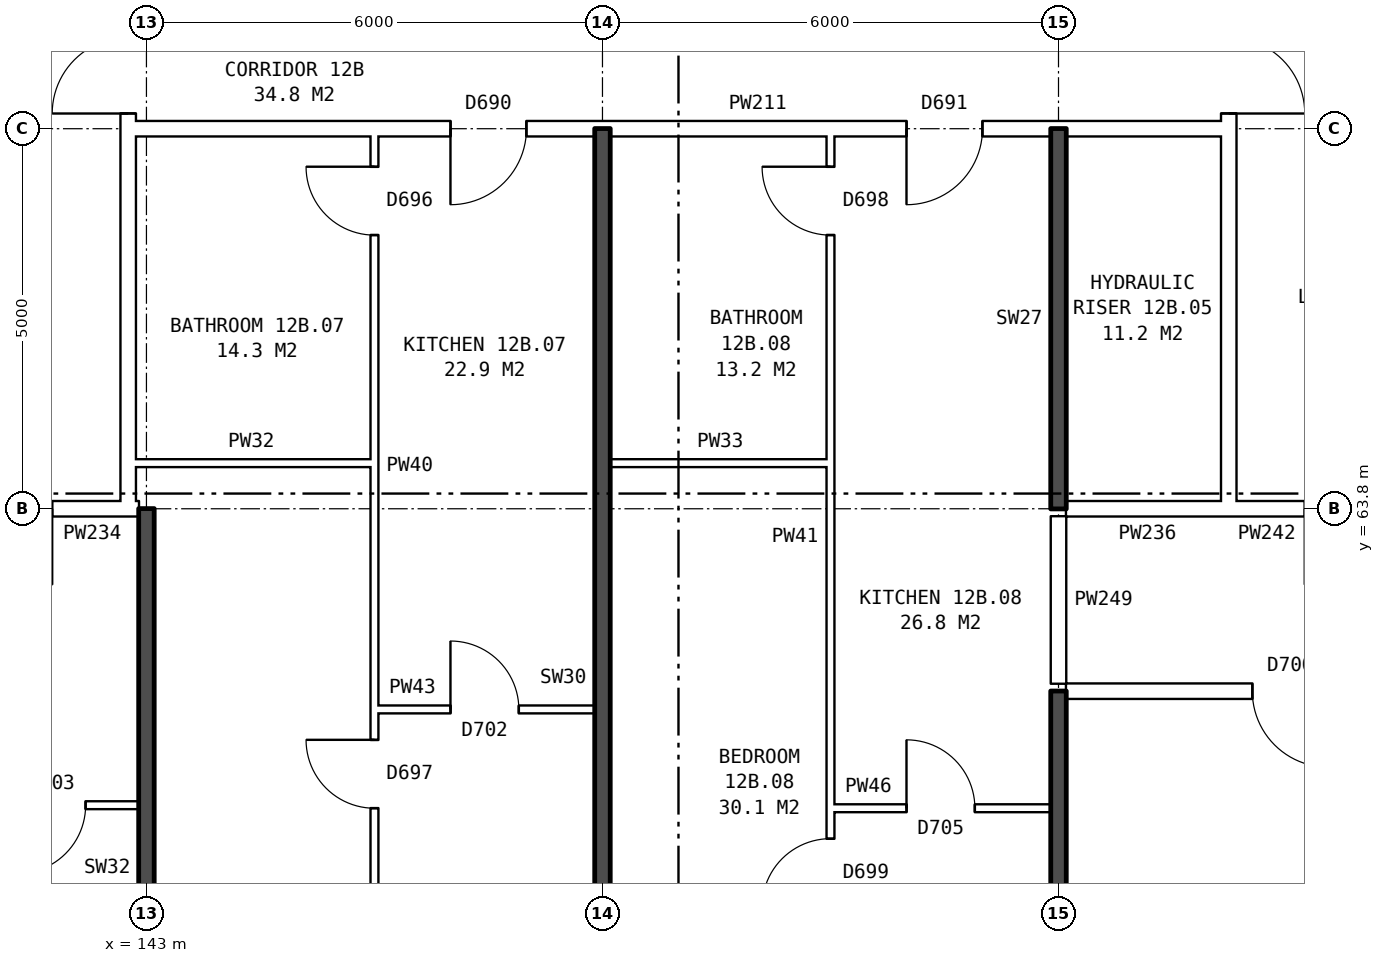
"""IFC4 building model, lengths in metres.
Left out: names, types, materials, properties, quantities, classifications, styles, units other than length and angle.
Written with IfcOpenShell. Run it as: python <this file> out.ifc"""

import sys

from ifc_helpers import new_model, si_unit, direction, frame, frame_2d, origin, place, context, subcontext, project, spatial, rectangle, extrude, element, fill, save


model = new_model("IFC4")
c1 = context("Model", 3, precision=1e-05, world=origin(), true_north=direction((0.0, 1.0)))
c2 = subcontext(c1, "Body", "Model", "MODEL_VIEW")
j1 = project(units=[si_unit("LENGTHUNIT", "METRE"), si_unit("PLANEANGLEUNIT", "RADIAN")], contexts=[c1])
p1 = place(None, origin())
s1 = spatial("IfcSite", under=j1, at=p1, CompositionType="ELEMENT")
p2 = place(p1, origin())
s2 = spatial("IfcBuilding", under=s1, at=p2, CompositionType="ELEMENT")
p3 = place(p2, frame((0.0, 0.0, 47.4)))
s3 = spatial("IfcBuildingStorey", under=s2, at=p3, CompositionType="ELEMENT", Elevation=47.4)
p4 = place(p3, frame((142.76, 63.9, 0.0), z_axis=(0.0, 0.0, 1.0), x_axis=(0.0, 1.0, 0.0)))
e1 = element("IfcWall", 1, at=p4, inside=s3, PredefinedType="PARTITIONING", context=c2, shape_type="SweptSolid", body=[
    extrude(rectangle(XDim=12.2, YDim=0.2, at=frame_2d((6.1, 0.0))), origin(), (0.0, 0.0, 1.0), 2.85),
])
p5 = place(p4, frame((5.1, 0.0, 0.0)))
e2 = element("IfcOpeningElement", 2, at=p5, cuts=e1, PredefinedType="OPENING", context=c2, shape_type="SweptSolid", body=[
    extrude(rectangle(XDim=2.0, YDim=2.1, at=frame_2d((1.0, 1.05))), frame((0.0, 0.11, 0.0), z_axis=(0.0, -1.0, 0.0), x_axis=(1.0, 0.0, 0.0)), (0.0, 0.0, 1.0), 0.22),
])
p6 = place(p3, frame((157.24, 63.9, 0.0), z_axis=(0.0, 0.0, 1.0), x_axis=(0.0, 1.0, 0.0)))
e3 = element("IfcWall", 3, at=p6, inside=s3, PredefinedType="PARTITIONING", context=c2, shape_type="SweptSolid", body=[
    extrude(rectangle(XDim=12.2, YDim=0.2, at=frame_2d((6.1, 0.0))), origin(), (0.0, 0.0, 1.0), 2.85),
])
p7 = place(p6, frame((5.1, 0.0, 0.0)))
e4 = element("IfcOpeningElement", 4, at=p7, cuts=e3, PredefinedType="OPENING", context=c2, shape_type="SweptSolid", body=[
    extrude(rectangle(XDim=2.0, YDim=2.1, at=frame_2d((1.0, 1.05))), frame((0.0, 0.11, 0.0), z_axis=(0.0, -1.0, 0.0), x_axis=(1.0, 0.0, 0.0)), (0.0, 0.0, 1.0), 0.22),
])
p8 = place(p3, frame((152.0, 59.86, 0.0), z_axis=(0.0, 0.0, 1.0), x_axis=(1.0, 0.0, 0.0)))
e5 = element("IfcWall", 5, at=p8, inside=s3, PredefinedType="PARTITIONING", context=c2, shape_type="SweptSolid", body=[
    extrude(rectangle(XDim=2.9, YDim=0.1, at=frame_2d((1.45, 0.0))), origin(), (0.0, 0.0, 1.0), 2.85),
])
p9 = place(p8, frame((1.0, 0.0, 0.0)))
e6 = element("IfcOpeningElement", 6, at=p9, cuts=e5, PredefinedType="OPENING", context=c2, shape_type="SweptSolid", body=[
    extrude(rectangle(XDim=0.9, YDim=2.1, at=frame_2d((0.45, 1.05))), frame((0.0, 0.06, 0.0), z_axis=(0.0, -1.0, 0.0), x_axis=(1.0, 0.0, 0.0)), (0.0, 0.0, 1.0), 0.12),
])
p10 = place(p3, frame((137.1, 59.9, 0.0), z_axis=(0.0, 0.0, 1.0), x_axis=(1.0, 0.0, 0.0)))
e7 = element("IfcWall", 7, at=p10, inside=s3, PredefinedType="PARTITIONING", context=c2, shape_type="SweptSolid", body=[
    extrude(rectangle(XDim=5.8, YDim=0.1, at=frame_2d((2.9, 0.0))), origin(), (0.0, 0.0, 1.0), 2.85),
])
p11 = place(p10, frame((1.3, 0.0, 0.0)))
e8 = element("IfcOpeningElement", 8, at=p11, cuts=e7, PredefinedType="OPENING", context=c2, shape_type="SweptSolid", body=[
    extrude(rectangle(XDim=0.9, YDim=2.1, at=frame_2d((0.45, 1.05))), frame((0.0, 0.06, 0.0), z_axis=(0.0, -1.0, 0.0), x_axis=(1.0, 0.0, 0.0)), (0.0, 0.0, 1.0), 0.12),
])
p12 = place(p10, frame((4.2, 0.0, 0.0)))
e9 = element("IfcOpeningElement", 9, at=p12, cuts=e7, PredefinedType="OPENING", context=c2, shape_type="SweptSolid", body=[
    extrude(rectangle(XDim=0.9, YDim=2.1, at=frame_2d((0.45, 1.05))), frame((0.0, 0.06, 0.0), z_axis=(0.0, -1.0, 0.0), x_axis=(1.0, 0.0, 0.0)), (0.0, 0.0, 1.0), 0.12),
])
p13 = place(p3, frame((146.0, 61.16, 0.0), z_axis=(0.0, 0.0, 1.0), x_axis=(1.0, 0.0, 0.0)))
e10 = element("IfcWall", 10, at=p13, inside=s3, PredefinedType="PARTITIONING", context=c2, shape_type="SweptSolid", body=[
    extrude(rectangle(XDim=2.9, YDim=0.1, at=frame_2d((1.45, 0.0))), origin(), (0.0, 0.0, 1.0), 2.85),
])
p14 = place(p13, frame((1.0, 0.0, 0.0)))
e11 = element("IfcOpeningElement", 11, at=p14, cuts=e10, PredefinedType="OPENING", context=c2, shape_type="SweptSolid", body=[
    extrude(rectangle(XDim=0.9, YDim=2.1, at=frame_2d((0.45, 1.05))), frame((0.0, 0.06, 0.0), z_axis=(0.0, -1.0, 0.0), x_axis=(1.0, 0.0, 0.0)), (0.0, 0.0, 1.0), 0.12),
])
p15 = place(p3, frame((155.1, 61.4, 0.0), z_axis=(0.0, 0.0, 1.0), x_axis=(1.0, 0.0, 0.0)))
e12 = element("IfcWall", 12, at=p15, inside=s3, PredefinedType="PARTITIONING", context=c2, shape_type="SweptSolid", body=[
    extrude(rectangle(XDim=21.04, YDim=0.2, at=frame_2d((10.52, 0.0))), origin(), (0.0, 0.0, 1.0), 2.85),
])
p16 = place(p15, frame((2.45, 0.0, 0.0)))
e13 = element("IfcOpeningElement", 13, at=p16, cuts=e12, PredefinedType="OPENING", context=c2, shape_type="SweptSolid", body=[
    extrude(rectangle(XDim=1.0, YDim=2.1, at=frame_2d((0.5, 1.05))), frame((0.0, 0.11, 0.0), z_axis=(0.0, -1.0, 0.0), x_axis=(1.0, 0.0, 0.0)), (0.0, 0.0, 1.0), 0.22),
])
p17 = place(p15, frame((14.4, 0.0, 0.0)))
e14 = element("IfcOpeningElement", 14, at=p17, cuts=e12, PredefinedType="OPENING", context=c2, shape_type="SweptSolid", body=[
    extrude(rectangle(XDim=1.0, YDim=2.1, at=frame_2d((0.5, 1.05))), frame((0.0, 0.11, 0.0), z_axis=(0.0, -1.0, 0.0), x_axis=(1.0, 0.0, 0.0)), (0.0, 0.0, 1.0), 0.22),
])
p18 = place(p3, frame((139.76, 63.8, 0.0), z_axis=(0.0, 0.0, 1.0), x_axis=(1.0, 0.0, 0.0)))
e15 = element("IfcWall", 15, at=p18, inside=s3, PredefinedType="PARTITIONING", context=c2, shape_type="SweptSolid", body=[
    extrude(rectangle(XDim=3.0, YDim=0.2, at=frame_2d((1.5, 0.0))), origin(), (0.0, 0.0, 1.0), 2.85),
])
p19 = place(p18, frame((1.0, 0.0, 0.0)))
e16 = element("IfcOpeningElement", 16, at=p19, cuts=e15, PredefinedType="OPENING", context=c2, shape_type="SweptSolid", body=[
    extrude(rectangle(XDim=1.0, YDim=2.1, at=frame_2d((0.5, 1.05))), frame((0.0, 0.11, 0.0), z_axis=(0.0, -1.0, 0.0), x_axis=(1.0, 0.0, 0.0)), (0.0, 0.0, 1.0), 0.22),
])
p20 = place(p3, frame((142.76, 63.8, 0.0), z_axis=(0.0, 0.0, 1.0), x_axis=(1.0, 0.0, 0.0)))
e17 = element("IfcWall", 17, at=p20, inside=s3, PredefinedType="PARTITIONING", context=c2, shape_type="SweptSolid", body=[
    extrude(rectangle(XDim=0.14, YDim=0.2, at=frame_2d((0.07, 0.0))), origin(), (0.0, 0.0, 1.0), 2.85),
])
p21 = place(p3, frame((155.1, 63.8, 0.0), z_axis=(0.0, 0.0, 1.0), x_axis=(1.0, 0.0, 0.0)))
e18 = element("IfcWall", 18, at=p21, inside=s3, PredefinedType="PARTITIONING", context=c2, shape_type="SweptSolid", body=[
    extrude(rectangle(XDim=2.14, YDim=0.2, at=frame_2d((1.07, 0.0))), origin(), (0.0, 0.0, 1.0), 2.85),
])
p22 = place(p3, frame((157.24, 63.8, 0.0), z_axis=(0.0, 0.0, 1.0), x_axis=(1.0, 0.0, 0.0)))
e19 = element("IfcWall", 19, at=p22, inside=s3, PredefinedType="PARTITIONING", context=c2, shape_type="SweptSolid", body=[
    extrude(rectangle(XDim=3.0, YDim=0.2, at=frame_2d((1.5, 0.0))), origin(), (0.0, 0.0, 1.0), 2.85),
])
p23 = place(p22, frame((1.0, 0.0, 0.0)))
e20 = element("IfcOpeningElement", 20, at=p23, cuts=e19, PredefinedType="OPENING", context=c2, shape_type="SweptSolid", body=[
    extrude(rectangle(XDim=1.0, YDim=2.1, at=frame_2d((0.5, 1.05))), frame((0.0, 0.11, 0.0), z_axis=(0.0, -1.0, 0.0), x_axis=(1.0, 0.0, 0.0)), (0.0, 0.0, 1.0), 0.22),
])
p24 = place(p3, frame((142.76, 64.4, 0.0), z_axis=(0.0, 0.0, 1.0), x_axis=(1.0, 0.0, 0.0)))
e21 = element("IfcWall", 21, at=p24, inside=s3, PredefinedType="PARTITIONING", context=c2, shape_type="SweptSolid", body=[
    extrude(rectangle(XDim=3.24, YDim=0.1, at=frame_2d((1.62, 0.0))), origin(), (0.0, 0.0, 1.0), 2.85),
])
p25 = place(p3, frame((149.1, 64.4, 0.0), z_axis=(0.0, 0.0, 1.0), x_axis=(1.0, 0.0, 0.0)))
e22 = element("IfcWall", 22, at=p25, inside=s3, PredefinedType="PARTITIONING", context=c2, shape_type="SweptSolid", body=[
    extrude(rectangle(XDim=2.9, YDim=0.1, at=frame_2d((1.45, 0.0))), origin(), (0.0, 0.0, 1.0), 2.85),
])
p26 = place(p3, frame((142.76, 68.8, 0.0), z_axis=(0.0, 0.0, 1.0), x_axis=(1.0, 0.0, 0.0)))
e23 = element("IfcWall", 23, at=p26, inside=s3, PredefinedType="PARTITIONING", context=c2, shape_type="SweptSolid", body=[
    extrude(rectangle(XDim=14.48, YDim=0.2, at=frame_2d((7.24, 0.0))), origin(), (0.0, 0.0, 1.0), 2.85),
])
p27 = place(p26, frame((4.24, 0.0, 0.0)))
e24 = element("IfcOpeningElement", 24, at=p27, cuts=e23, PredefinedType="OPENING", context=c2, shape_type="SweptSolid", body=[
    extrude(rectangle(XDim=1.0, YDim=2.1, at=frame_2d((0.5, 1.05))), frame((0.0, 0.11, 0.0), z_axis=(0.0, -1.0, 0.0), x_axis=(1.0, 0.0, 0.0)), (0.0, 0.0, 1.0), 0.22),
])
p28 = place(p26, frame((10.24, 0.0, 0.0)))
e25 = element("IfcOpeningElement", 25, at=p28, cuts=e23, PredefinedType="OPENING", context=c2, shape_type="SweptSolid", body=[
    extrude(rectangle(XDim=1.0, YDim=2.1, at=frame_2d((0.5, 1.05))), frame((0.0, 0.11, 0.0), z_axis=(0.0, -1.0, 0.0), x_axis=(1.0, 0.0, 0.0)), (0.0, 0.0, 1.0), 0.22),
])
p29 = place(p3, frame((143.0, 54.36, 0.0), z_axis=(0.0, 0.0, 1.0), x_axis=(0.0, 1.0, 0.0)))
e26 = element("IfcWall", 26, at=p29, inside=s3, PredefinedType="SOLIDWALL", context=c2, shape_type="SweptSolid", body=[
    extrude(rectangle(XDim=9.44, YDim=0.2, at=frame_2d((4.72, 0.0))), origin(), (0.0, 0.0, 1.0), 2.85),
])
p30 = place(p3, frame((146.0, 54.36, 0.0), z_axis=(0.0, 0.0, 1.0), x_axis=(0.0, 1.0, 0.0)))
e27 = element("IfcWall", 27, at=p30, inside=s3, PredefinedType="PARTITIONING", context=c2, shape_type="SweptSolid", body=[
    extrude(rectangle(XDim=14.34, YDim=0.1, at=frame_2d((7.17, 0.0))), origin(), (0.0, 0.0, 1.0), 2.85),
])
p31 = place(p30, frame((5.5, 0.0, 0.0)))
e28 = element("IfcOpeningElement", 28, at=p31, cuts=e27, PredefinedType="OPENING", context=c2, shape_type="SweptSolid", body=[
    extrude(rectangle(XDim=0.9, YDim=2.1, at=frame_2d((0.45, 1.05))), frame((0.0, 0.06, 0.0), z_axis=(0.0, -1.0, 0.0), x_axis=(1.0, 0.0, 0.0)), (0.0, 0.0, 1.0), 0.12),
])
p32 = place(p30, frame((13.04, 0.0, 0.0)))
e29 = element("IfcOpeningElement", 29, at=p32, cuts=e27, PredefinedType="OPENING", context=c2, shape_type="SweptSolid", body=[
    extrude(rectangle(XDim=0.9, YDim=2.1, at=frame_2d((0.45, 1.05))), frame((0.0, 0.06, 0.0), z_axis=(0.0, -1.0, 0.0), x_axis=(1.0, 0.0, 0.0)), (0.0, 0.0, 1.0), 0.12),
])
p33 = place(p3, frame((149.0, 54.36, 0.0), z_axis=(0.0, 0.0, 1.0), x_axis=(0.0, 1.0, 0.0)))
e30 = element("IfcWall", 30, at=p33, inside=s3, PredefinedType="SOLIDWALL", context=c2, shape_type="SweptSolid", body=[
    extrude(rectangle(XDim=14.44, YDim=0.2, at=frame_2d((7.22, 0.0))), origin(), (0.0, 0.0, 1.0), 2.85),
])
p34 = place(p3, frame((152.0, 54.36, 0.0), z_axis=(0.0, 0.0, 1.0), x_axis=(0.0, 1.0, 0.0)))
e31 = element("IfcWall", 31, at=p34, inside=s3, PredefinedType="PARTITIONING", context=c2, shape_type="SweptSolid", body=[
    extrude(rectangle(XDim=14.34, YDim=0.1, at=frame_2d((7.17, 0.0))), origin(), (0.0, 0.0, 1.0), 2.85),
])
p35 = place(p34, frame((4.2, 0.0, 0.0)))
e32 = element("IfcOpeningElement", 32, at=p35, cuts=e31, PredefinedType="OPENING", context=c2, shape_type="SweptSolid", body=[
    extrude(rectangle(XDim=0.9, YDim=2.1, at=frame_2d((0.45, 1.05))), frame((0.0, 0.06, 0.0), z_axis=(0.0, -1.0, 0.0), x_axis=(1.0, 0.0, 0.0)), (0.0, 0.0, 1.0), 0.12),
])
p36 = place(p34, frame((13.04, 0.0, 0.0)))
e33 = element("IfcOpeningElement", 33, at=p36, cuts=e31, PredefinedType="OPENING", context=c2, shape_type="SweptSolid", body=[
    extrude(rectangle(XDim=0.9, YDim=2.1, at=frame_2d((0.45, 1.05))), frame((0.0, 0.06, 0.0), z_axis=(0.0, -1.0, 0.0), x_axis=(1.0, 0.0, 0.0)), (0.0, 0.0, 1.0), 0.12),
])
p37 = place(p3, frame((155.0, 54.36, 0.0), z_axis=(0.0, 0.0, 1.0), x_axis=(0.0, 1.0, 0.0)))
e34 = element("IfcWall", 34, at=p37, inside=s3, PredefinedType="SOLIDWALL", context=c2, shape_type="SweptSolid", body=[
    extrude(rectangle(XDim=7.04, YDim=0.2, at=frame_2d((3.52, 0.0))), origin(), (0.0, 0.0, 1.0), 2.85),
])
p38 = place(p3, frame((155.0, 61.5, 0.0), z_axis=(0.0, 0.0, 1.0), x_axis=(0.0, 1.0, 0.0)))
e35 = element("IfcWall", 35, at=p38, inside=s3, PredefinedType="PARTITIONING", context=c2, shape_type="SweptSolid", body=[
    extrude(rectangle(XDim=2.2, YDim=0.2, at=frame_2d((1.1, 0.0))), origin(), (0.0, 0.0, 1.0), 2.85),
])
p39 = place(p3, frame((155.0, 63.8, 0.0), z_axis=(0.0, 0.0, 1.0), x_axis=(0.0, 1.0, 0.0)))
e36 = element("IfcWall", 36, at=p39, inside=s3, PredefinedType="SOLIDWALL", context=c2, shape_type="SweptSolid", body=[
    extrude(rectangle(XDim=5.0, YDim=0.2, at=frame_2d((2.5, 0.0))), origin(), (0.0, 0.0, 1.0), 2.85),
])
p40 = place(p5, origin())
e37 = element("IfcDoor", 37, at=p40, inside=s3, OperationType="DOUBLE_DOOR_SINGLE_SWING", PredefinedType="DOOR", context=c2, shape_type="SweptSolid", body=[
    extrude(rectangle(XDim=2.0, YDim=2.1, at=frame_2d((1.0, 1.05))), frame((0.0, 0.025, 0.0), z_axis=(0.0, -1.0, 0.0), x_axis=(1.0, 0.0, 0.0)), (0.0, 0.0, 1.0), 0.05),
])
fill(e2, e37)
p41 = place(p7, frame((2.0, 0.0, 0.0), z_axis=(0.0, 0.0, 1.0), x_axis=(-1.0, 0.0, 0.0)))
e38 = element("IfcDoor", 38, at=p41, inside=s3, OperationType="DOUBLE_DOOR_SINGLE_SWING", PredefinedType="DOOR", context=c2, shape_type="SweptSolid", body=[
    extrude(rectangle(XDim=2.0, YDim=2.1, at=frame_2d((1.0, 1.05))), frame((0.0, 0.025, 0.0), z_axis=(0.0, -1.0, 0.0), x_axis=(1.0, 0.0, 0.0)), (0.0, 0.0, 1.0), 0.05),
])
fill(e4, e38)
p42 = place(p12, frame((0.9, 0.0, 0.0), z_axis=(0.0, 0.0, 1.0), x_axis=(-1.0, 0.0, 0.0)))
e39 = element("IfcDoor", 39, at=p42, inside=s3, OperationType="SINGLE_SWING_RIGHT", PredefinedType="DOOR", context=c2, shape_type="SweptSolid", body=[
    extrude(rectangle(XDim=0.9, YDim=2.1, at=frame_2d((0.45, 1.05))), frame((0.0, 0.025, 0.0), z_axis=(0.0, -1.0, 0.0), x_axis=(1.0, 0.0, 0.0)), (0.0, 0.0, 1.0), 0.05),
])
fill(e9, e39)
p43 = place(p31, origin())
e40 = element("IfcDoor", 40, at=p43, inside=s3, OperationType="SINGLE_SWING_RIGHT", PredefinedType="DOOR", context=c2, shape_type="SweptSolid", body=[
    extrude(rectangle(XDim=0.9, YDim=2.1, at=frame_2d((0.45, 1.05))), frame((0.0, 0.025, 0.0), z_axis=(0.0, -1.0, 0.0), x_axis=(1.0, 0.0, 0.0)), (0.0, 0.0, 1.0), 0.05),
])
fill(e28, e40)
p44 = place(p27, frame((1.0, 0.0, 0.0), z_axis=(0.0, 0.0, 1.0), x_axis=(-1.0, 0.0, 0.0)))
e41 = element("IfcDoor", 41, at=p44, inside=s3, OperationType="SINGLE_SWING_RIGHT", PredefinedType="DOOR", context=c2, shape_type="SweptSolid", body=[
    extrude(rectangle(XDim=1.0, YDim=2.1, at=frame_2d((0.5, 1.05))), frame((0.0, 0.025, 0.0), z_axis=(0.0, -1.0, 0.0), x_axis=(1.0, 0.0, 0.0)), (0.0, 0.0, 1.0), 0.05),
])
fill(e24, e41)
p45 = place(p14, origin())
e42 = element("IfcDoor", 42, at=p45, inside=s3, OperationType="SINGLE_SWING_LEFT", PredefinedType="DOOR", context=c2, shape_type="SweptSolid", body=[
    extrude(rectangle(XDim=0.9, YDim=2.1, at=frame_2d((0.45, 1.05))), frame((0.0, 0.025, 0.0), z_axis=(0.0, -1.0, 0.0), x_axis=(1.0, 0.0, 0.0)), (0.0, 0.0, 1.0), 0.05),
])
fill(e11, e42)
p46 = place(p32, origin())
e43 = element("IfcDoor", 43, at=p46, inside=s3, OperationType="SINGLE_SWING_RIGHT", PredefinedType="DOOR", context=c2, shape_type="SweptSolid", body=[
    extrude(rectangle(XDim=0.9, YDim=2.1, at=frame_2d((0.45, 1.05))), frame((0.0, 0.025, 0.0), z_axis=(0.0, -1.0, 0.0), x_axis=(1.0, 0.0, 0.0)), (0.0, 0.0, 1.0), 0.05),
])
fill(e29, e43)
p47 = place(p35, origin())
e44 = element("IfcDoor", 44, at=p47, inside=s3, OperationType="SINGLE_SWING_LEFT", PredefinedType="DOOR", context=c2, shape_type="SweptSolid", body=[
    extrude(rectangle(XDim=0.9, YDim=2.1, at=frame_2d((0.45, 1.05))), frame((0.0, 0.025, 0.0), z_axis=(0.0, -1.0, 0.0), x_axis=(1.0, 0.0, 0.0)), (0.0, 0.0, 1.0), 0.05),
])
fill(e32, e44)
p48 = place(p28, frame((1.0, 0.0, 0.0), z_axis=(0.0, 0.0, 1.0), x_axis=(-1.0, 0.0, 0.0)))
e45 = element("IfcDoor", 45, at=p48, inside=s3, OperationType="SINGLE_SWING_RIGHT", PredefinedType="DOOR", context=c2, shape_type="SweptSolid", body=[
    extrude(rectangle(XDim=1.0, YDim=2.1, at=frame_2d((0.5, 1.05))), frame((0.0, 0.025, 0.0), z_axis=(0.0, -1.0, 0.0), x_axis=(1.0, 0.0, 0.0)), (0.0, 0.0, 1.0), 0.05),
])
fill(e25, e45)
p49 = place(p9, origin())
e46 = element("IfcDoor", 46, at=p49, inside=s3, OperationType="SINGLE_SWING_LEFT", PredefinedType="DOOR", context=c2, shape_type="SweptSolid", body=[
    extrude(rectangle(XDim=0.9, YDim=2.1, at=frame_2d((0.45, 1.05))), frame((0.0, 0.025, 0.0), z_axis=(0.0, -1.0, 0.0), x_axis=(1.0, 0.0, 0.0)), (0.0, 0.0, 1.0), 0.05),
])
fill(e6, e46)
p50 = place(p36, origin())
e47 = element("IfcDoor", 47, at=p50, inside=s3, OperationType="SINGLE_SWING_RIGHT", PredefinedType="DOOR", context=c2, shape_type="SweptSolid", body=[
    extrude(rectangle(XDim=0.9, YDim=2.1, at=frame_2d((0.45, 1.05))), frame((0.0, 0.025, 0.0), z_axis=(0.0, -1.0, 0.0), x_axis=(1.0, 0.0, 0.0)), (0.0, 0.0, 1.0), 0.05),
])
fill(e33, e47)
p51 = place(p16, frame((1.0, 0.0, 0.0), z_axis=(0.0, 0.0, 1.0), x_axis=(-1.0, 0.0, 0.0)))
e48 = element("IfcDoor", 48, at=p51, inside=s3, OperationType="SINGLE_SWING_LEFT", PredefinedType="DOOR", context=c2, shape_type="SweptSolid", body=[
    extrude(rectangle(XDim=1.0, YDim=2.1, at=frame_2d((0.5, 1.05))), frame((0.0, 0.025, 0.0), z_axis=(0.0, -1.0, 0.0), x_axis=(1.0, 0.0, 0.0)), (0.0, 0.0, 1.0), 0.05),
])
fill(e13, e48)
save(model, sys.argv[1])
